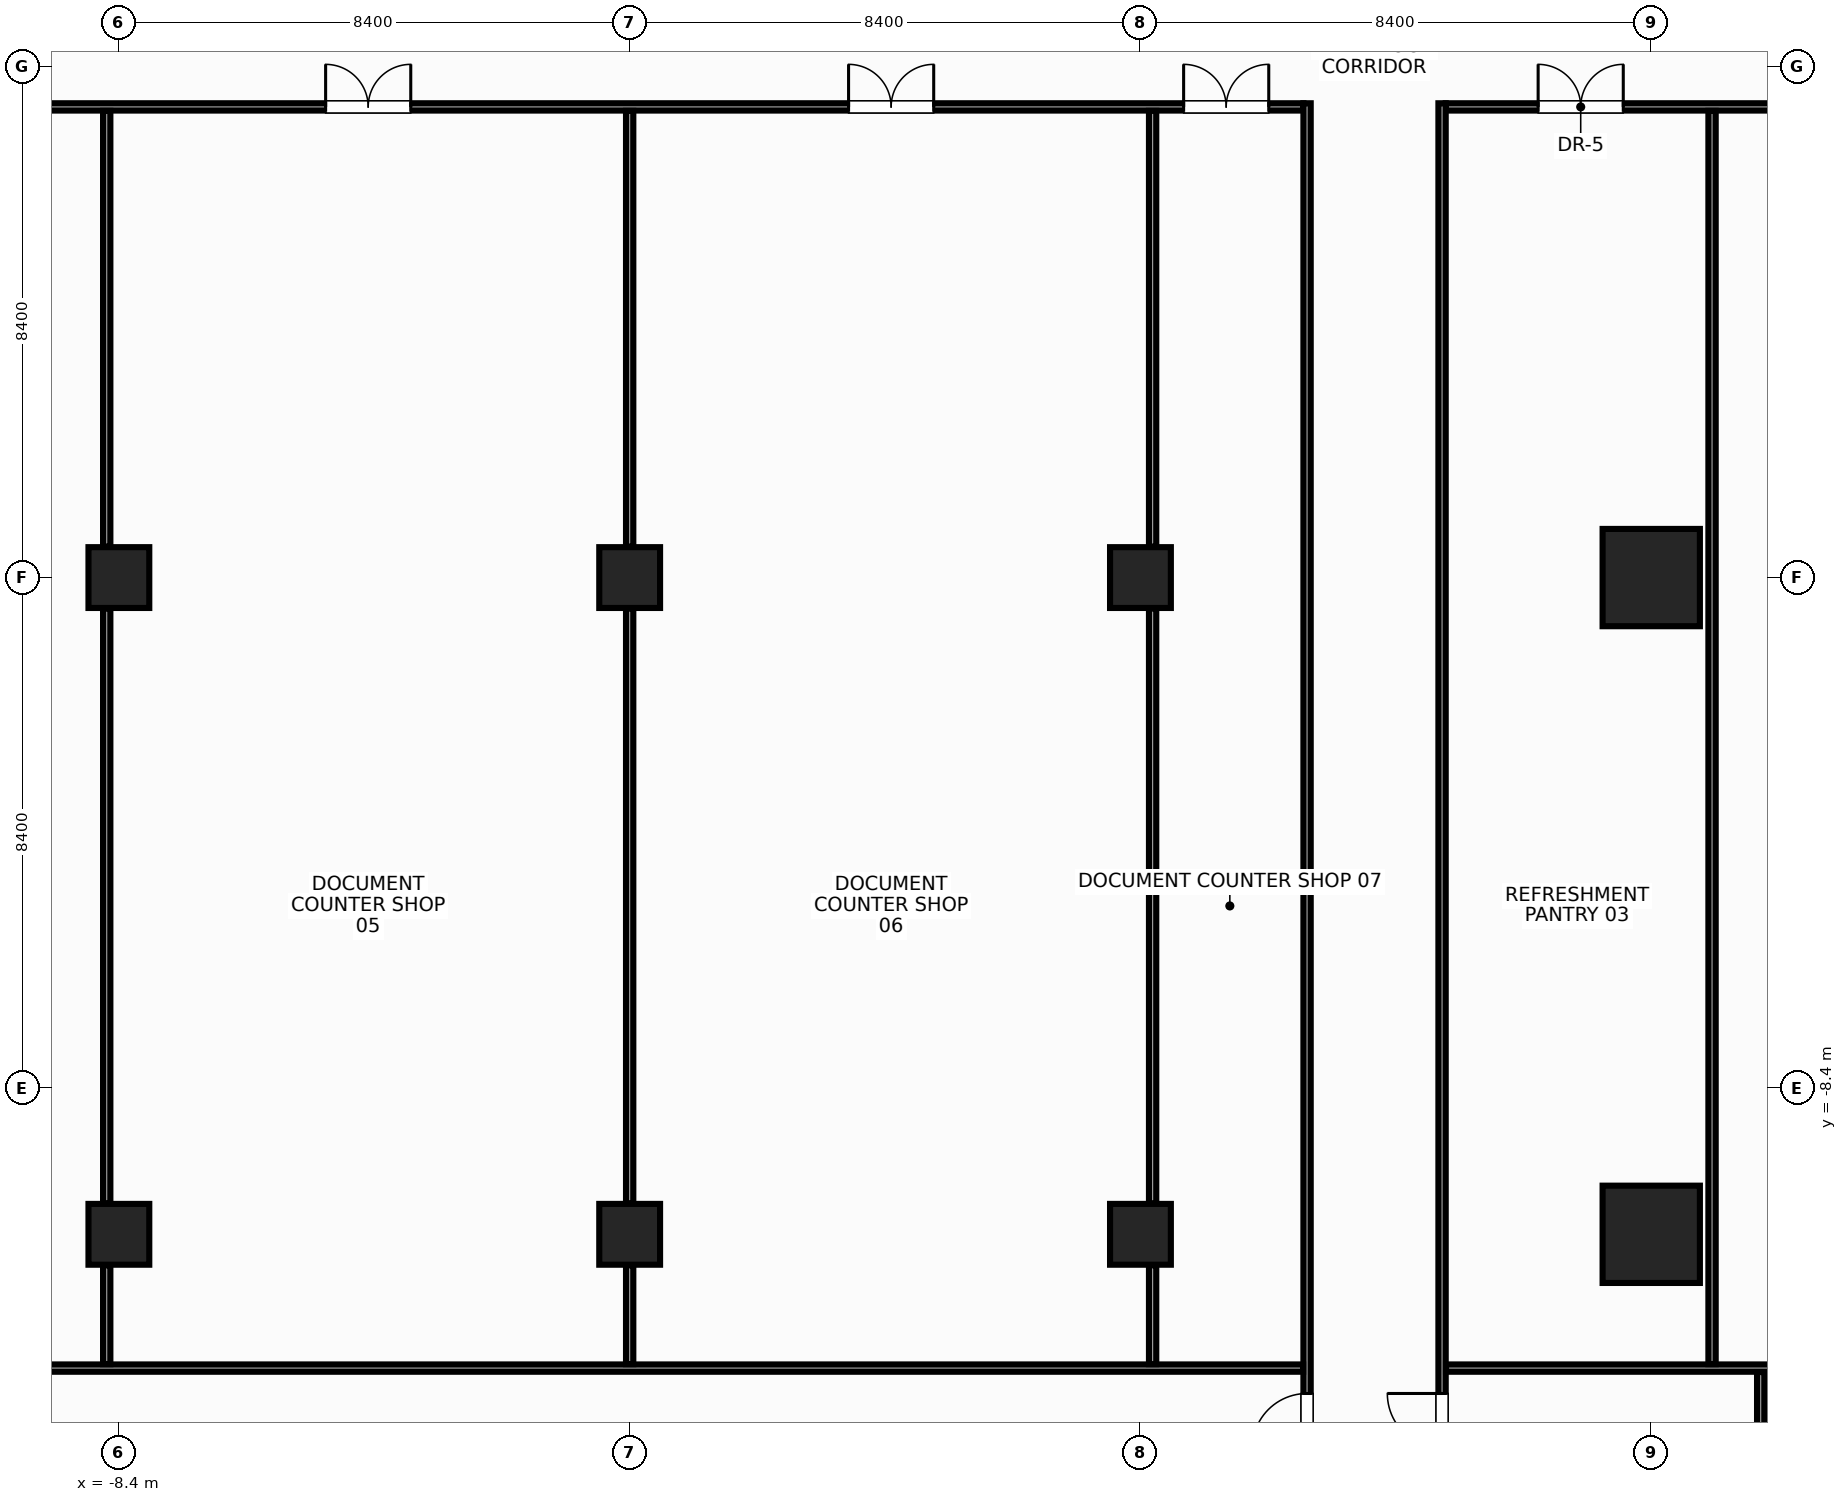
"""IFC4 building model, lengths in metres.
Left out: names, types, materials, properties, quantities, classifications, styles, units other than length and angle.
Written with IfcOpenShell. Run it as: python <this file> out.ifc"""

import sys

from ifc_helpers import new_model, si_unit, direction, frame, frame_2d, origin, origin_2d, place, context, subcontext, project, spatial, rectangle, hollow_rectangle, extrude, source, transform, mapped, element, fill, save


model = new_model("IFC4")
c1 = context("Model", 3, precision=1e-05, world=origin(), true_north=direction((0.0, 1.0)))
c2 = subcontext(c1, "Body", "Model", "MODEL_VIEW")
j1 = project(units=[si_unit("LENGTHUNIT", "METRE"), si_unit("PLANEANGLEUNIT", "RADIAN")], contexts=[c1])
p1 = place(None, origin())
s1 = spatial("IfcSite", under=j1, at=p1, CompositionType="ELEMENT")
p2 = place(p1, origin())
s2 = spatial("IfcBuilding", under=s1, at=p2, CompositionType="ELEMENT")
p3 = place(p2, frame((0.0, 0.0, 185.6)))
s3 = spatial("IfcBuildingStorey", under=s2, at=p3, CompositionType="ELEMENT", Elevation=185.6)
m1 = source(origin(), c2, "Body", "SweptSolid", [
    extrude(rectangle(XDim=1.6, YDim=1.6, at=origin_2d()), origin(), (0.0, 0.0, 1.0), 3.6),
])
for number, where, z_axis, x_axis in (
    (1, (16.8, -10.8, 0.0), (0.0, 0.0, 1.0), (1.0, 0.0, 0.0)),
    (2, (16.8, 0.0, 0.0), (0.0, 0.0, 1.0), (1.0, 0.0, 0.0)),
):
    element("IfcColumn", number, at=place(p3, frame(where, z_axis=z_axis, x_axis=x_axis)), inside=s3, PredefinedType="COLUMN", context=c2, shape_type="MappedRepresentation", body=[
        mapped(m1, transform((0.0, 0.0, 0.0), x_axis=(1.0, 0.0, 0.0), y_axis=(0.0, 1.0, 0.0), z_axis=(0.0, 0.0, 1.0), scale=1.0)),
    ])
m2 = source(origin(), c2, "Body", "SweptSolid", [
    extrude(hollow_rectangle(XDim=1.0, YDim=1.0, WallThickness=0.045, at=origin_2d()), origin(), (0.0, 0.0, 1.0), 3.6),
])
for number, where, z_axis, x_axis in (
    (3, (-8.4, 0.0, 0.0), (0.0, 0.0, 1.0), (1.0, 0.0, 0.0)),
    (4, (-8.4, -10.8, 0.0), (0.0, 0.0, 1.0), (1.0, 0.0, 0.0)),
    (5, (8.4, 0.0, 0.0), (0.0, 0.0, 1.0), (1.0, 0.0, 0.0)),
    (6, (8.4, -10.8, 0.0), (0.0, 0.0, 1.0), (1.0, 0.0, 0.0)),
):
    element("IfcColumn", number, at=place(p3, frame(where, z_axis=z_axis, x_axis=x_axis)), inside=s3, PredefinedType="COLUMN", context=c2, shape_type="MappedRepresentation", body=[
        mapped(m2, transform((0.0, 0.0, 0.0), x_axis=(1.0, 0.0, 0.0), y_axis=(0.0, 1.0, 0.0), z_axis=(0.0, 0.0, 1.0), scale=1.0)),
    ])
m3 = source(origin(), c2, "Body", "SweptSolid", [
    extrude(rectangle(XDim=1.0, YDim=1.0, at=origin_2d()), origin(), (0.0, 0.0, 1.0), 3.6),
])
for number, where, z_axis, x_axis in (
    (7, (0.0, -10.8, 0.0), (0.0, 0.0, 1.0), (1.0, 0.0, 0.0)),
    (8, (0.0, 0.0, 0.0), (0.0, 0.0, 1.0), (1.0, 0.0, 0.0)),
):
    element("IfcColumn", number, at=place(p3, frame(where, z_axis=z_axis, x_axis=x_axis)), inside=s3, PredefinedType="COLUMN", context=c2, shape_type="MappedRepresentation", body=[
        mapped(m3, transform((0.0, 0.0, 0.0), x_axis=(1.0, 0.0, 0.0), y_axis=(0.0, 1.0, 0.0), z_axis=(0.0, 0.0, 1.0), scale=1.0)),
    ])
m4 = source(origin(), c2, "Body", "SweptSolid", [
    extrude(rectangle(XDim=31.6, YDim=0.12, at=frame_2d((15.8, 0.0))), origin(), (0.0, 0.0, 1.0), 2.685),
])
p4 = place(p3, frame((-20.52, 7.74, 0.0), z_axis=(0.0, 0.0, 1.0), x_axis=(1.0, 0.0, 0.0)))
e9 = element("IfcWall", 9, at=p4, inside=s3, PredefinedType="PARTITIONING", context=c2, shape_type="MappedRepresentation", body=[
    mapped(m4, transform((0.0, 0.0, 0.0), x_axis=(1.0, 0.0, 0.0), y_axis=(0.0, 1.0, 0.0), z_axis=(0.0, 0.0, 1.0), scale=1.0)),
])
p5 = place(p4, frame((0.5, 0.0, 0.0)))
e10 = element("IfcOpeningElement", 10, at=p5, cuts=e9, PredefinedType="OPENING", context=c2, shape_type="SweptSolid", body=[
    extrude(rectangle(XDim=0.9, YDim=2.15, at=frame_2d((0.45, 1.075))), frame((0.0, 0.072, 0.0), z_axis=(0.0, -1.0, 0.0), x_axis=(1.0, 0.0, 0.0)), (0.0, 0.0, 1.0), 0.144),
])
p6 = place(p4, frame((6.4, 0.0, 0.0)))
e11 = element("IfcOpeningElement", 11, at=p6, cuts=e9, PredefinedType="OPENING", context=c2, shape_type="SweptSolid", body=[
    extrude(rectangle(XDim=1.4, YDim=2.2, at=frame_2d((0.7, 1.1))), frame((0.0, 0.072, 0.0), z_axis=(0.0, -1.0, 0.0), x_axis=(1.0, 0.0, 0.0)), (0.0, 0.0, 1.0), 0.144),
])
p7 = place(p4, frame((15.52, 0.0, 0.0)))
e12 = element("IfcOpeningElement", 12, at=p7, cuts=e9, PredefinedType="OPENING", context=c2, shape_type="SweptSolid", body=[
    extrude(rectangle(XDim=1.4, YDim=2.2, at=frame_2d((0.7, 1.1))), frame((0.0, 0.072, 0.0), z_axis=(0.0, -1.0, 0.0), x_axis=(1.0, 0.0, 0.0)), (0.0, 0.0, 1.0), 0.144),
])
p8 = place(p4, frame((24.12, 0.0, 0.0)))
e13 = element("IfcOpeningElement", 13, at=p8, cuts=e9, PredefinedType="OPENING", context=c2, shape_type="SweptSolid", body=[
    extrude(rectangle(XDim=1.4, YDim=2.2, at=frame_2d((0.7, 1.1))), frame((0.0, 0.072, 0.0), z_axis=(0.0, -1.0, 0.0), x_axis=(1.0, 0.0, 0.0)), (0.0, 0.0, 1.0), 0.144),
])
p9 = place(p4, frame((29.63, 0.0, 0.0)))
e14 = element("IfcOpeningElement", 14, at=p9, cuts=e9, PredefinedType="OPENING", context=c2, shape_type="SweptSolid", body=[
    extrude(rectangle(XDim=1.4, YDim=2.2, at=frame_2d((0.7, 1.1))), frame((0.0, 0.072, 0.0), z_axis=(0.0, -1.0, 0.0), x_axis=(1.0, 0.0, 0.0)), (0.0, 0.0, 1.0), 0.144),
])
m5 = source(origin(), c2, "Body", "SweptSolid", [
    extrude(rectangle(XDim=7.1, YDim=0.12, at=frame_2d((3.55, 0.0))), origin(), (0.0, 0.0, 1.0), 2.685),
])
p10 = place(p3, frame((13.42, 7.74, 0.0), z_axis=(0.0, 0.0, 1.0), x_axis=(1.0, 0.0, 0.0)))
e15 = element("IfcWall", 15, at=p10, inside=s3, PredefinedType="PARTITIONING", context=c2, shape_type="MappedRepresentation", body=[
    mapped(m5, transform((0.0, 0.0, 0.0), x_axis=(1.0, 0.0, 0.0), y_axis=(0.0, 1.0, 0.0), z_axis=(0.0, 0.0, 1.0), scale=1.0)),
])
p11 = place(p10, frame((5.7, 0.0, 0.0)))
e16 = element("IfcOpeningElement", 16, at=p11, cuts=e15, PredefinedType="OPENING", context=c2, shape_type="SweptSolid", body=[
    extrude(rectangle(XDim=0.9, YDim=2.15, at=frame_2d((0.45, 1.075))), frame((0.0, 0.072, 0.0), z_axis=(0.0, -1.0, 0.0), x_axis=(1.0, 0.0, 0.0)), (0.0, 0.0, 1.0), 0.144),
])
p12 = place(p10, frame((1.52, 0.0, 0.0)))
e17 = element("IfcOpeningElement", 17, at=p12, cuts=e15, PredefinedType="OPENING", context=c2, shape_type="SweptSolid", body=[
    extrude(rectangle(XDim=1.4, YDim=2.2, at=frame_2d((0.7, 1.1))), frame((0.0, 0.072, 0.0), z_axis=(0.0, -1.0, 0.0), x_axis=(1.0, 0.0, 0.0)), (0.0, 0.0, 1.0), 0.144),
])
m6 = source(origin(), c2, "Body", "SweptSolid", [
    extrude(rectangle(XDim=22.595, YDim=0.12, at=frame_2d((11.297, 0.0))), origin(), (0.0, 0.0, 1.0), 2.585),
])
p13 = place(p3, frame((11.14, -14.795, 0.0), z_axis=(0.0, 0.0, 1.0), x_axis=(0.0, 1.0, 0.0)))
e18 = element("IfcWall", 18, at=p13, inside=s3, PredefinedType="PARTITIONING", context=c2, shape_type="MappedRepresentation", body=[
    mapped(m6, transform((0.0, 0.0, 0.0), x_axis=(1.0, 0.0, 0.0), y_axis=(0.0, 1.0, 0.0), z_axis=(0.0, 0.0, 1.0), scale=1.0)),
])
p14 = place(p13, frame((0.478, 0.0, 0.0)))
e19 = element("IfcOpeningElement", 19, at=p14, cuts=e18, PredefinedType="OPENING", context=c2, shape_type="SweptSolid", body=[
    extrude(rectangle(XDim=0.9, YDim=2.15, at=frame_2d((0.45, 1.075))), frame((0.0, 0.072, 0.0), z_axis=(0.0, -1.0, 0.0), x_axis=(1.0, 0.0, 0.0)), (0.0, 0.0, 1.0), 0.144),
])
p15 = place(p3, frame((13.36, -14.795, 0.0), z_axis=(0.0, 0.0, 1.0), x_axis=(0.0, 1.0, 0.0)))
e20 = element("IfcWall", 20, at=p15, inside=s3, PredefinedType="PARTITIONING", context=c2, shape_type="MappedRepresentation", body=[
    mapped(m6, transform((0.0, 0.0, 0.0), x_axis=(1.0, 0.0, 0.0), y_axis=(0.0, 1.0, 0.0), z_axis=(0.0, 0.0, 1.0), scale=1.0)),
])
p16 = place(p15, frame((0.478, 0.0, 0.0)))
e21 = element("IfcOpeningElement", 21, at=p16, cuts=e20, PredefinedType="OPENING", context=c2, shape_type="SweptSolid", body=[
    extrude(rectangle(XDim=0.9, YDim=2.15, at=frame_2d((0.45, 1.075))), frame((0.0, 0.072, 0.0), z_axis=(0.0, -1.0, 0.0), x_axis=(1.0, 0.0, 0.0)), (0.0, 0.0, 1.0), 0.144),
])
m7 = source(origin(), c2, "Body", "SweptSolid", [
    extrude(rectangle(XDim=34.925, YDim=0.12, at=frame_2d((17.462, 0.0))), origin(), (0.0, 0.0, 1.0), 2.885),
])
p17 = place(p3, frame((-23.85, -13.0, 0.0), z_axis=(0.0, 0.0, 1.0), x_axis=(1.0, 0.0, 0.0)))
e22 = element("IfcWall", 22, at=p17, inside=s3, PredefinedType="PARTITIONING", context=c2, shape_type="MappedRepresentation", body=[
    mapped(m7, transform((0.0, 0.0, 0.0), x_axis=(1.0, 0.0, 0.0), y_axis=(0.0, 1.0, 0.0), z_axis=(0.0, 0.0, 1.0), scale=1.0)),
])
p18 = place(p17, frame((1.515, 0.0, 0.0)))
e23 = element("IfcOpeningElement", 23, at=p18, cuts=e22, PredefinedType="OPENING", context=c2, shape_type="SweptSolid", body=[
    extrude(rectangle(XDim=1.4, YDim=2.2, at=frame_2d((0.7, 1.1))), frame((0.0, 0.072, 0.0), z_axis=(0.0, -1.0, 0.0), x_axis=(1.0, 0.0, 0.0)), (0.0, 0.0, 1.0), 0.144),
])
p19 = place(p17, frame((8.15, 0.0, 0.0)))
e24 = element("IfcOpeningElement", 24, at=p19, cuts=e22, PredefinedType="OPENING", context=c2, shape_type="SweptSolid", body=[
    extrude(rectangle(XDim=1.4, YDim=2.2, at=frame_2d((0.7, 1.1))), frame((0.0, 0.072, 0.0), z_axis=(0.0, -1.0, 0.0), x_axis=(1.0, 0.0, 0.0)), (0.0, 0.0, 1.0), 0.144),
])
m8 = source(origin(), c2, "Body", "SweptSolid", [
    extrude(rectangle(XDim=10.425, YDim=0.12, at=frame_2d((5.212, 0.0))), origin(), (0.0, 0.0, 1.0), 2.885),
])
p20 = place(p3, frame((13.425, -13.0, 0.0), z_axis=(0.0, 0.0, 1.0), x_axis=(1.0, 0.0, 0.0)))
e25 = element("IfcWall", 25, at=p20, inside=s3, PredefinedType="PARTITIONING", context=c2, shape_type="MappedRepresentation", body=[
    mapped(m8, transform((0.0, 0.0, 0.0), x_axis=(1.0, 0.0, 0.0), y_axis=(0.0, 1.0, 0.0), z_axis=(0.0, 0.0, 1.0), scale=1.0)),
])
p21 = place(p20, frame((7.51, 0.0, 0.0)))
e26 = element("IfcOpeningElement", 26, at=p21, cuts=e25, PredefinedType="OPENING", context=c2, shape_type="SweptSolid", body=[
    extrude(rectangle(XDim=1.4, YDim=2.2, at=frame_2d((0.7, 1.1))), frame((0.0, 0.072, 0.0), z_axis=(0.0, -1.0, 0.0), x_axis=(1.0, 0.0, 0.0)), (0.0, 0.0, 1.0), 0.144),
])
m9 = source(origin(), c2, "Body", "SweptSolid", [
    extrude(rectangle(XDim=1.625, YDim=0.12, at=frame_2d((0.812, 0.0))), origin(), (0.0, 0.0, 1.0), 2.885),
])
p22 = place(p3, frame((-8.6, -12.935, 0.0), z_axis=(0.0, 0.0, 1.0), x_axis=(0.0, 1.0, 0.0)))
e27 = element("IfcWall", 27, at=p22, inside=s3, PredefinedType="PARTITIONING", context=c2, shape_type="MappedRepresentation", body=[
    mapped(m9, transform((0.0, 0.0, 0.0), x_axis=(1.0, 0.0, 0.0), y_axis=(0.0, 1.0, 0.0), z_axis=(0.0, 0.0, 1.0), scale=1.0)),
])
m10 = source(origin(), c2, "Body", "SweptSolid", [
    extrude(rectangle(XDim=9.78, YDim=0.12, at=frame_2d((4.89, 0.0))), origin(), (0.0, 0.0, 1.0), 2.685),
])
p23 = place(p3, frame((-8.6, -10.29, 0.0), z_axis=(0.0, 0.0, 1.0), x_axis=(0.0, 1.0, 0.0)))
e28 = element("IfcWall", 28, at=p23, inside=s3, PredefinedType="PARTITIONING", context=c2, shape_type="MappedRepresentation", body=[
    mapped(m10, transform((0.0, 0.0, 0.0), x_axis=(1.0, 0.0, 0.0), y_axis=(0.0, 1.0, 0.0), z_axis=(0.0, 0.0, 1.0), scale=1.0)),
])
m11 = source(origin(), c2, "Body", "SweptSolid", [
    extrude(rectangle(XDim=7.165, YDim=0.12, at=frame_2d((3.583, 0.0))), origin(), (0.0, 0.0, 1.0), 2.585),
])
p24 = place(p3, frame((-8.6, 0.51, 0.0), z_axis=(0.0, 0.0, 1.0), x_axis=(0.0, 1.0, 0.0)))
e29 = element("IfcWall", 29, at=p24, inside=s3, PredefinedType="PARTITIONING", context=c2, shape_type="MappedRepresentation", body=[
    mapped(m11, transform((0.0, 0.0, 0.0), x_axis=(1.0, 0.0, 0.0), y_axis=(0.0, 1.0, 0.0), z_axis=(0.0, 0.0, 1.0), scale=1.0)),
])
p25 = place(p3, frame((0.0, -12.935, 0.0), z_axis=(0.0, 0.0, 1.0), x_axis=(0.0, 1.0, 0.0)))
e30 = element("IfcWall", 30, at=p25, inside=s3, PredefinedType="PARTITIONING", context=c2, shape_type="MappedRepresentation", body=[
    mapped(m9, transform((0.0, 0.0, 0.0), x_axis=(1.0, 0.0, 0.0), y_axis=(0.0, 1.0, 0.0), z_axis=(0.0, 0.0, 1.0), scale=1.0)),
])
p26 = place(p3, frame((0.0, -10.29, 0.0), z_axis=(0.0, 0.0, 1.0), x_axis=(0.0, 1.0, 0.0)))
e31 = element("IfcWall", 31, at=p26, inside=s3, PredefinedType="PARTITIONING", context=c2, shape_type="MappedRepresentation", body=[
    mapped(m10, transform((0.0, 0.0, 0.0), x_axis=(1.0, 0.0, 0.0), y_axis=(0.0, 1.0, 0.0), z_axis=(0.0, 0.0, 1.0), scale=1.0)),
])
p27 = place(p3, frame((0.0, 0.51, 0.0), z_axis=(0.0, 0.0, 1.0), x_axis=(0.0, 1.0, 0.0)))
e32 = element("IfcWall", 32, at=p27, inside=s3, PredefinedType="PARTITIONING", context=c2, shape_type="MappedRepresentation", body=[
    mapped(m11, transform((0.0, 0.0, 0.0), x_axis=(1.0, 0.0, 0.0), y_axis=(0.0, 1.0, 0.0), z_axis=(0.0, 0.0, 1.0), scale=1.0)),
])
p28 = place(p3, frame((8.6, -12.935, 0.0), z_axis=(0.0, 0.0, 1.0), x_axis=(0.0, 1.0, 0.0)))
e33 = element("IfcWall", 33, at=p28, inside=s3, PredefinedType="PARTITIONING", context=c2, shape_type="MappedRepresentation", body=[
    mapped(m9, transform((0.0, 0.0, 0.0), x_axis=(1.0, 0.0, 0.0), y_axis=(0.0, 1.0, 0.0), z_axis=(0.0, 0.0, 1.0), scale=1.0)),
])
p29 = place(p3, frame((8.6, -10.29, 0.0), z_axis=(0.0, 0.0, 1.0), x_axis=(0.0, 1.0, 0.0)))
e34 = element("IfcWall", 34, at=p29, inside=s3, PredefinedType="PARTITIONING", context=c2, shape_type="MappedRepresentation", body=[
    mapped(m10, transform((0.0, 0.0, 0.0), x_axis=(1.0, 0.0, 0.0), y_axis=(0.0, 1.0, 0.0), z_axis=(0.0, 0.0, 1.0), scale=1.0)),
])
p30 = place(p3, frame((8.6, 0.51, 0.0), z_axis=(0.0, 0.0, 1.0), x_axis=(0.0, 1.0, 0.0)))
e35 = element("IfcWall", 35, at=p30, inside=s3, PredefinedType="PARTITIONING", context=c2, shape_type="MappedRepresentation", body=[
    mapped(m11, transform((0.0, 0.0, 0.0), x_axis=(1.0, 0.0, 0.0), y_axis=(0.0, 1.0, 0.0), z_axis=(0.0, 0.0, 1.0), scale=1.0)),
])
m12 = source(origin(), c2, "Body", "SweptSolid", [
    extrude(rectangle(XDim=20.61, YDim=0.12, at=frame_2d((10.305, 0.0))), origin(), (0.0, 0.0, 1.0), 2.835),
])
p31 = place(p3, frame((17.8, -12.935, 0.0), z_axis=(0.0, 0.0, 1.0), x_axis=(0.0, 1.0, 0.0)))
e36 = element("IfcWall", 36, at=p31, inside=s3, PredefinedType="PARTITIONING", context=c2, shape_type="MappedRepresentation", body=[
    mapped(m12, transform((0.0, 0.0, 0.0), x_axis=(1.0, 0.0, 0.0), y_axis=(0.0, 1.0, 0.0), z_axis=(0.0, 0.0, 1.0), scale=1.0)),
])
m13 = source(origin(), c2, "Body", "SweptSolid", [
    extrude(rectangle(XDim=4.027, YDim=0.12, at=frame_2d((2.014, 0.0))), origin(), (0.0, 0.0, 1.0), 3.3),
])
p32 = place(p3, frame((18.6, -17.092, 0.0), z_axis=(0.0, 0.0, 1.0), x_axis=(0.0, 1.0, 0.0)))
e37 = element("IfcWall", 37, at=p32, inside=s3, PredefinedType="PARTITIONING", context=c2, shape_type="MappedRepresentation", body=[
    mapped(m13, transform((0.0, 0.0, 0.0), x_axis=(1.0, 0.0, 0.0), y_axis=(0.0, 1.0, 0.0), z_axis=(0.0, 0.0, 1.0), scale=1.0)),
])
m14 = source(origin(), c2, "Body", "SweptSolid", [
    extrude(rectangle(XDim=1.4, YDim=2.2, at=frame_2d((0.7, 1.1))), frame((0.0, 0.025, 0.0), z_axis=(0.0, -1.0, 0.0), x_axis=(1.0, 0.0, 0.0)), (0.0, 0.0, 1.0), 0.05),
])
p33 = place(p12, origin())
e38 = element("IfcDoor", 38, at=p33, inside=s3, OperationType="DOUBLE_DOOR_SINGLE_SWING", PredefinedType="DOOR", context=c2, shape_type="MappedRepresentation", body=[
    mapped(m14, transform((0.0, 0.0, 0.0), x_axis=(1.0, 0.0, 0.0), y_axis=(0.0, 1.0, 0.0), z_axis=(0.0, 0.0, 1.0), scale=1.0)),
])
fill(e17, e38)
p34 = place(p7, origin())
e39 = element("IfcDoor", 39, at=p34, inside=s3, OperationType="DOUBLE_DOOR_SINGLE_SWING", PredefinedType="DOOR", context=c2, shape_type="MappedRepresentation", body=[
    mapped(m14, transform((0.0, 0.0, 0.0), x_axis=(1.0, 0.0, 0.0), y_axis=(0.0, 1.0, 0.0), z_axis=(0.0, 0.0, 1.0), scale=1.0)),
])
fill(e12, e39)
p35 = place(p8, origin())
e40 = element("IfcDoor", 40, at=p35, inside=s3, OperationType="DOUBLE_DOOR_SINGLE_SWING", PredefinedType="DOOR", context=c2, shape_type="MappedRepresentation", body=[
    mapped(m14, transform((0.0, 0.0, 0.0), x_axis=(1.0, 0.0, 0.0), y_axis=(0.0, 1.0, 0.0), z_axis=(0.0, 0.0, 1.0), scale=1.0)),
])
fill(e13, e40)
p36 = place(p9, origin())
e41 = element("IfcDoor", 41, at=p36, inside=s3, OperationType="DOUBLE_DOOR_SINGLE_SWING", PredefinedType="DOOR", context=c2, shape_type="MappedRepresentation", body=[
    mapped(m14, transform((0.0, 0.0, 0.0), x_axis=(1.0, 0.0, 0.0), y_axis=(0.0, 1.0, 0.0), z_axis=(0.0, 0.0, 1.0), scale=1.0)),
])
fill(e14, e41)
m15 = source(origin(), c2, "Body", "SweptSolid", [
    extrude(rectangle(XDim=0.9, YDim=2.15, at=frame_2d((0.45, 1.075))), frame((0.0, 0.025, 0.0), z_axis=(0.0, -1.0, 0.0), x_axis=(1.0, 0.0, 0.0)), (0.0, 0.0, 1.0), 0.05),
])
p37 = place(p14, origin())
e42 = element("IfcDoor", 42, at=p37, inside=s3, OperationType="SINGLE_SWING_LEFT", PredefinedType="DOOR", context=c2, shape_type="MappedRepresentation", body=[
    mapped(m15, transform((0.0, 0.0, 0.0), x_axis=(1.0, 0.0, 0.0), y_axis=(0.0, 1.0, 0.0), z_axis=(0.0, 0.0, 1.0), scale=1.0)),
])
fill(e19, e42)
p38 = place(p16, origin())
e43 = element("IfcDoor", 43, at=p38, inside=s3, OperationType="SINGLE_SWING_RIGHT", PredefinedType="DOOR", context=c2, shape_type="MappedRepresentation", body=[
    mapped(m15, transform((0.0, 0.0, 0.0), x_axis=(1.0, 0.0, 0.0), y_axis=(0.0, 1.0, 0.0), z_axis=(0.0, 0.0, 1.0), scale=1.0)),
])
fill(e21, e43)
save(model, sys.argv[1])
